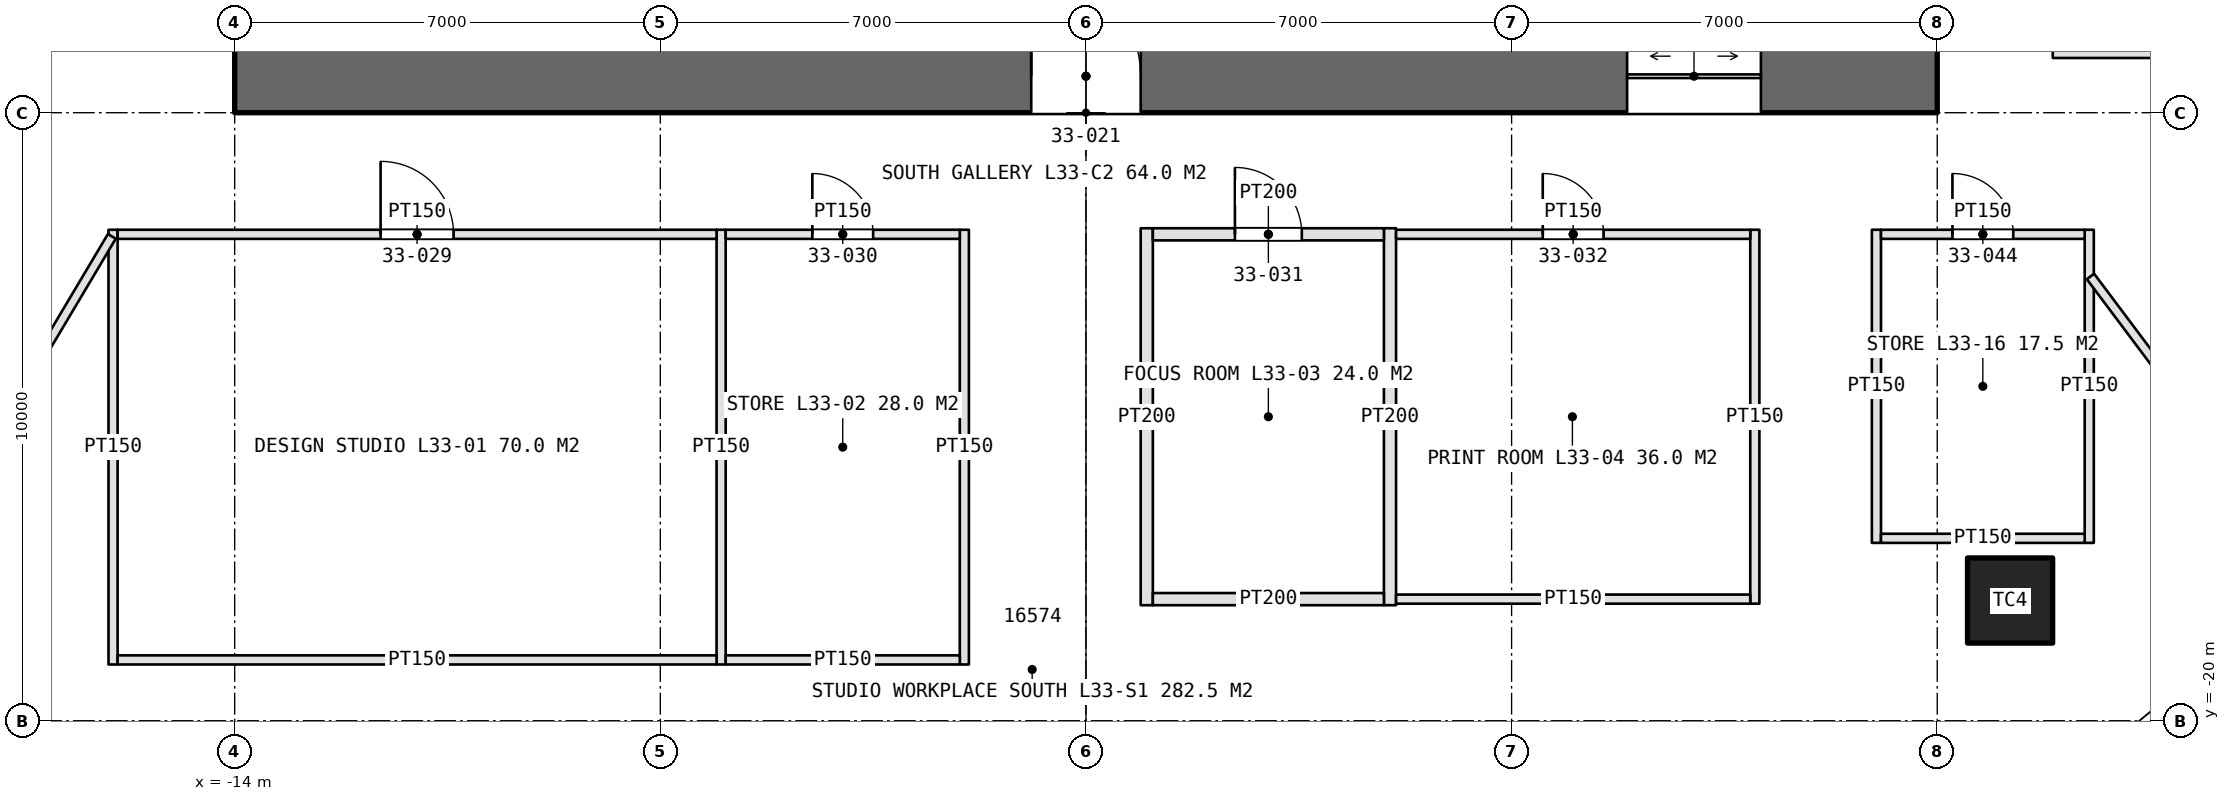
"""IFC4 building model, lengths in metres.
Left out: names, types, materials, properties, quantities, classifications, styles, units other than length and angle.
Written with IfcOpenShell. Run it as: python <this file> out.ifc"""

import sys

from ifc_helpers import new_model, si_unit, direction, frame, frame_2d, origin, origin_2d, place, context, subcontext, project, spatial, rectangle, extrude, element, fill, save


model = new_model("IFC4")
c1 = context("Model", 3, precision=1e-05, world=origin(), true_north=direction((0.0, 1.0)))
c2 = subcontext(c1, "Body", "Model", "MODEL_VIEW")
j1 = project(units=[si_unit("LENGTHUNIT", "METRE"), si_unit("PLANEANGLEUNIT", "RADIAN")], contexts=[c1])
p1 = place(None, origin())
s1 = spatial("IfcSite", under=j1, at=p1, CompositionType="ELEMENT")
p2 = place(p1, origin())
s2 = spatial("IfcBuilding", under=s1, at=p2, CompositionType="ELEMENT")
p3 = place(p2, frame((0.0, 0.0, 155.4)))
s3 = spatial("IfcBuildingStorey", under=s2, at=p3, CompositionType="ELEMENT", Elevation=155.4)
p4 = place(p3, frame((-14.0, -9.4, 0.0), z_axis=(0.0, 0.0, 1.0), x_axis=(1.0, 0.0, 0.0)))
e1 = element("IfcWall", 1, at=p4, inside=s3, PredefinedType="SHEAR", context=c2, shape_type="SweptSolid", body=[
    extrude(rectangle(XDim=28.0, YDim=1.2, at=frame_2d((14.0, 0.0))), origin(), (0.0, 0.0, 1.0), 4.2),
])
p5 = place(p4, frame((13.1, 0.0, 0.0)))
e2 = element("IfcOpeningElement", 2, at=p5, cuts=e1, PredefinedType="OPENING", context=c2, shape_type="SweptSolid", body=[
    extrude(rectangle(XDim=1.8, YDim=2.4, at=frame_2d((0.9, 1.2))), frame((0.0, 0.61, 0.0), z_axis=(0.0, -1.0, 0.0), x_axis=(1.0, 0.0, 0.0)), (0.0, 0.0, 1.0), 1.22),
])
p6 = place(p4, frame((22.9, 0.0, 0.0)))
e3 = element("IfcOpeningElement", 3, at=p6, cuts=e1, PredefinedType="OPENING", context=c2, shape_type="SweptSolid", body=[
    extrude(rectangle(XDim=2.2, YDim=2.7, at=frame_2d((1.1, 1.35))), frame((0.0, 0.61, 0.0), z_axis=(0.0, -1.0, 0.0), x_axis=(1.0, 0.0, 0.0)), (0.0, 0.0, 1.0), 1.22),
])
p7 = place(p3, frame((15.198, -18.023, 0.0), z_axis=(0.0, 0.0, 1.0), x_axis=(1.0, 0.0, 0.0)))
e4 = element("IfcColumn", 4, at=p7, inside=s3, PredefinedType="COLUMN", context=c2, shape_type="SweptSolid", body=[
    extrude(rectangle(XDim=1.4, YDim=1.4, at=origin_2d()), origin(), (0.0, 0.0, 1.0), 4.2),
])
for number, where, z_axis, x_axis in (
    (5, (-16.0, -11.925, 0.0), (0.0, 0.0, 1.0), (0.0, -1.0, 0.0)),
    (6, (-6.0, -11.925, 0.0), (0.0, 0.0, 1.0), (0.0, -1.0, 0.0)),
    (7, (-2.0, -11.925, 0.0), (0.0, 0.0, 1.0), (0.0, -1.0, 0.0)),
):
    element("IfcWall", number, at=place(p3, frame(where, z_axis=z_axis, x_axis=x_axis)), inside=s3, PredefinedType="PARTITIONING", context=c2, shape_type="SweptSolid", body=[
        extrude(rectangle(XDim=7.15, YDim=0.15, at=frame_2d((3.575, 0.0))), origin(), (0.0, 0.0, 1.0), 3.0),
    ])
p8 = place(p3, frame((-15.925, -12.0, 0.0), z_axis=(0.0, 0.0, 1.0), x_axis=(1.0, 0.0, 0.0)))
e8 = element("IfcWall", 8, at=p8, inside=s3, PredefinedType="PARTITIONING", context=c2, shape_type="SweptSolid", body=[
    extrude(rectangle(XDim=9.85, YDim=0.15, at=frame_2d((4.925, 0.0))), origin(), (0.0, 0.0, 1.0), 3.0),
])
p9 = place(p8, frame((4.325, 0.0, 0.0)))
e9 = element("IfcOpeningElement", 9, at=p9, cuts=e8, PredefinedType="OPENING", context=c2, shape_type="SweptSolid", body=[
    extrude(rectangle(XDim=1.2, YDim=2.4, at=frame_2d((0.6, 1.2))), frame((0.0, 0.085, 0.0), z_axis=(0.0, -1.0, 0.0), x_axis=(1.0, 0.0, 0.0)), (0.0, 0.0, 1.0), 0.17),
])
p10 = place(p3, frame((-15.925, -19.0, 0.0), z_axis=(0.0, 0.0, 1.0), x_axis=(1.0, 0.0, 0.0)))
e10 = element("IfcWall", 10, at=p10, inside=s3, PredefinedType="PARTITIONING", context=c2, shape_type="SweptSolid", body=[
    extrude(rectangle(XDim=9.85, YDim=0.15, at=frame_2d((4.925, 0.0))), origin(), (0.0, 0.0, 1.0), 3.0),
])
p11 = place(p3, frame((-5.925, -12.0, 0.0), z_axis=(0.0, 0.0, 1.0), x_axis=(1.0, 0.0, 0.0)))
e11 = element("IfcWall", 11, at=p11, inside=s3, PredefinedType="PARTITIONING", context=c2, shape_type="SweptSolid", body=[
    extrude(rectangle(XDim=3.85, YDim=0.15, at=frame_2d((1.925, 0.0))), origin(), (0.0, 0.0, 1.0), 3.0),
])
p12 = place(p11, frame((1.425, 0.0, 0.0)))
e12 = element("IfcOpeningElement", 12, at=p12, cuts=e11, PredefinedType="OPENING", context=c2, shape_type="SweptSolid", body=[
    extrude(rectangle(XDim=1.0, YDim=2.2, at=frame_2d((0.5, 1.1))), frame((0.0, 0.085, 0.0), z_axis=(0.0, -1.0, 0.0), x_axis=(1.0, 0.0, 0.0)), (0.0, 0.0, 1.0), 0.17),
])
p13 = place(p3, frame((-5.925, -19.0, 0.0), z_axis=(0.0, 0.0, 1.0), x_axis=(1.0, 0.0, 0.0)))
e13 = element("IfcWall", 13, at=p13, inside=s3, PredefinedType="PARTITIONING", context=c2, shape_type="SweptSolid", body=[
    extrude(rectangle(XDim=3.85, YDim=0.15, at=frame_2d((1.925, 0.0))), origin(), (0.0, 0.0, 1.0), 3.0),
])
for number, where, z_axis, x_axis in (
    (14, (1.0, -11.9, 0.0), (0.0, 0.0, 1.0), (0.0, -1.0, 0.0)),
    (15, (5.0, -11.9, 0.0), (0.0, 0.0, 1.0), (0.0, -1.0, 0.0)),
):
    element("IfcWall", number, at=place(p3, frame(where, z_axis=z_axis, x_axis=x_axis)), inside=s3, PredefinedType="PARTITIONING", context=c2, shape_type="SweptSolid", body=[
        extrude(rectangle(XDim=6.2, YDim=0.2, at=frame_2d((3.1, 0.0))), origin(), (0.0, 0.0, 1.0), 3.0),
    ])
p14 = place(p3, frame((11.0, -11.925, 0.0), z_axis=(0.0, 0.0, 1.0), x_axis=(0.0, -1.0, 0.0)))
e16 = element("IfcWall", 16, at=p14, inside=s3, PredefinedType="PARTITIONING", context=c2, shape_type="SweptSolid", body=[
    extrude(rectangle(XDim=6.15, YDim=0.15, at=frame_2d((3.075, 0.0))), origin(), (0.0, 0.0, 1.0), 3.0),
])
p15 = place(p3, frame((1.1, -12.0, 0.0), z_axis=(0.0, 0.0, 1.0), x_axis=(1.0, 0.0, 0.0)))
e17 = element("IfcWall", 17, at=p15, inside=s3, PredefinedType="PARTITIONING", context=c2, shape_type="SweptSolid", body=[
    extrude(rectangle(XDim=3.8, YDim=0.2, at=frame_2d((1.9, 0.0))), origin(), (0.0, 0.0, 1.0), 3.0),
])
p16 = place(p15, frame((1.35, 0.0, 0.0)))
e18 = element("IfcOpeningElement", 18, at=p16, cuts=e17, PredefinedType="OPENING", context=c2, shape_type="SweptSolid", body=[
    extrude(rectangle(XDim=1.1, YDim=2.3, at=frame_2d((0.55, 1.15))), frame((0.0, 0.11, 0.0), z_axis=(0.0, -1.0, 0.0), x_axis=(1.0, 0.0, 0.0)), (0.0, 0.0, 1.0), 0.22),
])
p17 = place(p3, frame((1.1, -18.0, 0.0), z_axis=(0.0, 0.0, 1.0), x_axis=(1.0, 0.0, 0.0)))
e19 = element("IfcWall", 19, at=p17, inside=s3, PredefinedType="PARTITIONING", context=c2, shape_type="SweptSolid", body=[
    extrude(rectangle(XDim=3.8, YDim=0.2, at=frame_2d((1.9, 0.0))), origin(), (0.0, 0.0, 1.0), 3.0),
])
p18 = place(p3, frame((5.1, -12.0, 0.0), z_axis=(0.0, 0.0, 1.0), x_axis=(1.0, 0.0, 0.0)))
e20 = element("IfcWall", 20, at=p18, inside=s3, PredefinedType="PARTITIONING", context=c2, shape_type="SweptSolid", body=[
    extrude(rectangle(XDim=5.825, YDim=0.15, at=frame_2d((2.913, 0.0))), origin(), (0.0, 0.0, 1.0), 3.0),
])
p19 = place(p18, frame((2.413, 0.0, 0.0)))
e21 = element("IfcOpeningElement", 21, at=p19, cuts=e20, PredefinedType="OPENING", context=c2, shape_type="SweptSolid", body=[
    extrude(rectangle(XDim=1.0, YDim=2.2, at=frame_2d((0.5, 1.1))), frame((0.0, 0.085, 0.0), z_axis=(0.0, -1.0, 0.0), x_axis=(1.0, 0.0, 0.0)), (0.0, 0.0, 1.0), 0.17),
])
p20 = place(p3, frame((5.1, -18.0, 0.0), z_axis=(0.0, 0.0, 1.0), x_axis=(1.0, 0.0, 0.0)))
e22 = element("IfcWall", 22, at=p20, inside=s3, PredefinedType="PARTITIONING", context=c2, shape_type="SweptSolid", body=[
    extrude(rectangle(XDim=5.825, YDim=0.15, at=frame_2d((2.913, 0.0))), origin(), (0.0, 0.0, 1.0), 3.0),
])
p21 = place(p3, frame((15.9, -9.0, 0.0), z_axis=(0.0, 0.0, 1.0), x_axis=(1.0, 0.0, 0.0)))
e23 = element("IfcWall", 23, at=p21, inside=s3, PredefinedType="PARTITIONING", context=c2, shape_type="SweptSolid", body=[
    extrude(rectangle(XDim=7.2, YDim=0.2, at=frame_2d((3.6, 0.0))), origin(), (0.0, 0.0, 1.0), 3.0),
])
for number, where, z_axis, x_axis in (
    (24, (13.0, -11.925, 0.0), (0.0, 0.0, 1.0), (0.0, -1.0, 0.0)),
    (25, (16.5, -11.925, 0.0), (0.0, 0.0, 1.0), (0.0, -1.0, 0.0)),
):
    element("IfcWall", number, at=place(p3, frame(where, z_axis=z_axis, x_axis=x_axis)), inside=s3, PredefinedType="PARTITIONING", context=c2, shape_type="SweptSolid", body=[
        extrude(rectangle(XDim=5.15, YDim=0.15, at=frame_2d((2.575, 0.0))), origin(), (0.0, 0.0, 1.0), 3.0),
    ])
p22 = place(p3, frame((13.075, -12.0, 0.0), z_axis=(0.0, 0.0, 1.0), x_axis=(1.0, 0.0, 0.0)))
e26 = element("IfcWall", 26, at=p22, inside=s3, PredefinedType="PARTITIONING", context=c2, shape_type="SweptSolid", body=[
    extrude(rectangle(XDim=3.35, YDim=0.15, at=frame_2d((1.675, 0.0))), origin(), (0.0, 0.0, 1.0), 3.0),
])
p23 = place(p22, frame((1.175, 0.0, 0.0)))
e27 = element("IfcOpeningElement", 27, at=p23, cuts=e26, PredefinedType="OPENING", context=c2, shape_type="SweptSolid", body=[
    extrude(rectangle(XDim=1.0, YDim=2.2, at=frame_2d((0.5, 1.1))), frame((0.0, 0.085, 0.0), z_axis=(0.0, -1.0, 0.0), x_axis=(1.0, 0.0, 0.0)), (0.0, 0.0, 1.0), 0.17),
])
p24 = place(p3, frame((13.075, -17.0, 0.0), z_axis=(0.0, 0.0, 1.0), x_axis=(1.0, 0.0, 0.0)))
e28 = element("IfcWall", 28, at=p24, inside=s3, PredefinedType="PARTITIONING", context=c2, shape_type="SweptSolid", body=[
    extrude(rectangle(XDim=3.35, YDim=0.15, at=frame_2d((1.675, 0.0))), origin(), (0.0, 0.0, 1.0), 3.0),
])
p25 = place(p3, frame((-16.02, -12.034, 0.0), z_axis=(0.0, 0.0, 1.0), x_axis=(-0.511518902153, -0.859272024879, 0.0)))
e29 = element("IfcWall", 29, at=p25, inside=s3, PredefinedType="PARTITIONING", context=c2, shape_type="SweptSolid", body=[
    extrude(rectangle(XDim=8.451, YDim=0.15, at=frame_2d((4.226, 0.0))), origin(), (0.0, 0.0, 1.0), 3.0),
])
p26 = place(p3, frame((16.52, -12.693, 0.0), z_axis=(0.0, 0.0, 1.0), x_axis=(0.600036938918, -0.799972294479, 0.0)))
e30 = element("IfcWall", 30, at=p26, inside=s3, PredefinedType="PARTITIONING", context=c2, shape_type="SweptSolid", body=[
    extrude(rectangle(XDim=6.345, YDim=0.15, at=frame_2d((3.172, 0.0))), origin(), (0.0, 0.0, 1.0), 3.0),
])
p27 = place(p5, origin())
e31 = element("IfcDoor", 31, at=p27, inside=s3, OperationType="DOUBLE_DOOR_SINGLE_SWING", PredefinedType="DOOR", context=c2, shape_type="SweptSolid", body=[
    extrude(rectangle(XDim=1.8, YDim=2.4, at=frame_2d((0.9, 1.2))), frame((0.0, 0.025, 0.0), z_axis=(0.0, -1.0, 0.0), x_axis=(1.0, 0.0, 0.0)), (0.0, 0.0, 1.0), 0.05),
])
fill(e2, e31)
p28 = place(p6, origin())
e32 = element("IfcDoor", 32, at=p28, inside=s3, OperationType="DOUBLE_DOOR_SLIDING", PredefinedType="DOOR", context=c2, shape_type="SweptSolid", body=[
    extrude(rectangle(XDim=2.2, YDim=2.7, at=frame_2d((1.1, 1.35))), frame((0.0, 0.025, 0.0), z_axis=(0.0, -1.0, 0.0), x_axis=(1.0, 0.0, 0.0)), (0.0, 0.0, 1.0), 0.05),
])
fill(e3, e32)
p29 = place(p9, origin())
e33 = element("IfcDoor", 33, at=p29, inside=s3, OperationType="SINGLE_SWING_LEFT", PredefinedType="DOOR", context=c2, shape_type="SweptSolid", body=[
    extrude(rectangle(XDim=1.2, YDim=2.4, at=frame_2d((0.6, 1.2))), frame((0.0, 0.025, 0.0), z_axis=(0.0, -1.0, 0.0), x_axis=(1.0, 0.0, 0.0)), (0.0, 0.0, 1.0), 0.05),
])
fill(e9, e33)
p30 = place(p12, origin())
e34 = element("IfcDoor", 34, at=p30, inside=s3, OperationType="SINGLE_SWING_LEFT", PredefinedType="DOOR", context=c2, shape_type="SweptSolid", body=[
    extrude(rectangle(XDim=1.0, YDim=2.2, at=frame_2d((0.5, 1.1))), frame((0.0, 0.025, 0.0), z_axis=(0.0, -1.0, 0.0), x_axis=(1.0, 0.0, 0.0)), (0.0, 0.0, 1.0), 0.05),
])
fill(e12, e34)
p31 = place(p16, origin())
e35 = element("IfcDoor", 35, at=p31, inside=s3, OperationType="SINGLE_SWING_LEFT", PredefinedType="DOOR", context=c2, shape_type="SweptSolid", body=[
    extrude(rectangle(XDim=1.1, YDim=2.3, at=frame_2d((0.55, 1.15))), frame((0.0, 0.025, 0.0), z_axis=(0.0, -1.0, 0.0), x_axis=(1.0, 0.0, 0.0)), (0.0, 0.0, 1.0), 0.05),
])
fill(e18, e35)
p32 = place(p19, origin())
e36 = element("IfcDoor", 36, at=p32, inside=s3, OperationType="SINGLE_SWING_LEFT", PredefinedType="DOOR", context=c2, shape_type="SweptSolid", body=[
    extrude(rectangle(XDim=1.0, YDim=2.2, at=frame_2d((0.5, 1.1))), frame((0.0, 0.025, 0.0), z_axis=(0.0, -1.0, 0.0), x_axis=(1.0, 0.0, 0.0)), (0.0, 0.0, 1.0), 0.05),
])
fill(e21, e36)
p33 = place(p23, origin())
e37 = element("IfcDoor", 37, at=p33, inside=s3, OperationType="SINGLE_SWING_LEFT", PredefinedType="DOOR", context=c2, shape_type="SweptSolid", body=[
    extrude(rectangle(XDim=1.0, YDim=2.2, at=frame_2d((0.5, 1.1))), frame((0.0, 0.025, 0.0), z_axis=(0.0, -1.0, 0.0), x_axis=(1.0, 0.0, 0.0)), (0.0, 0.0, 1.0), 0.05),
])
fill(e27, e37)
save(model, sys.argv[1])
